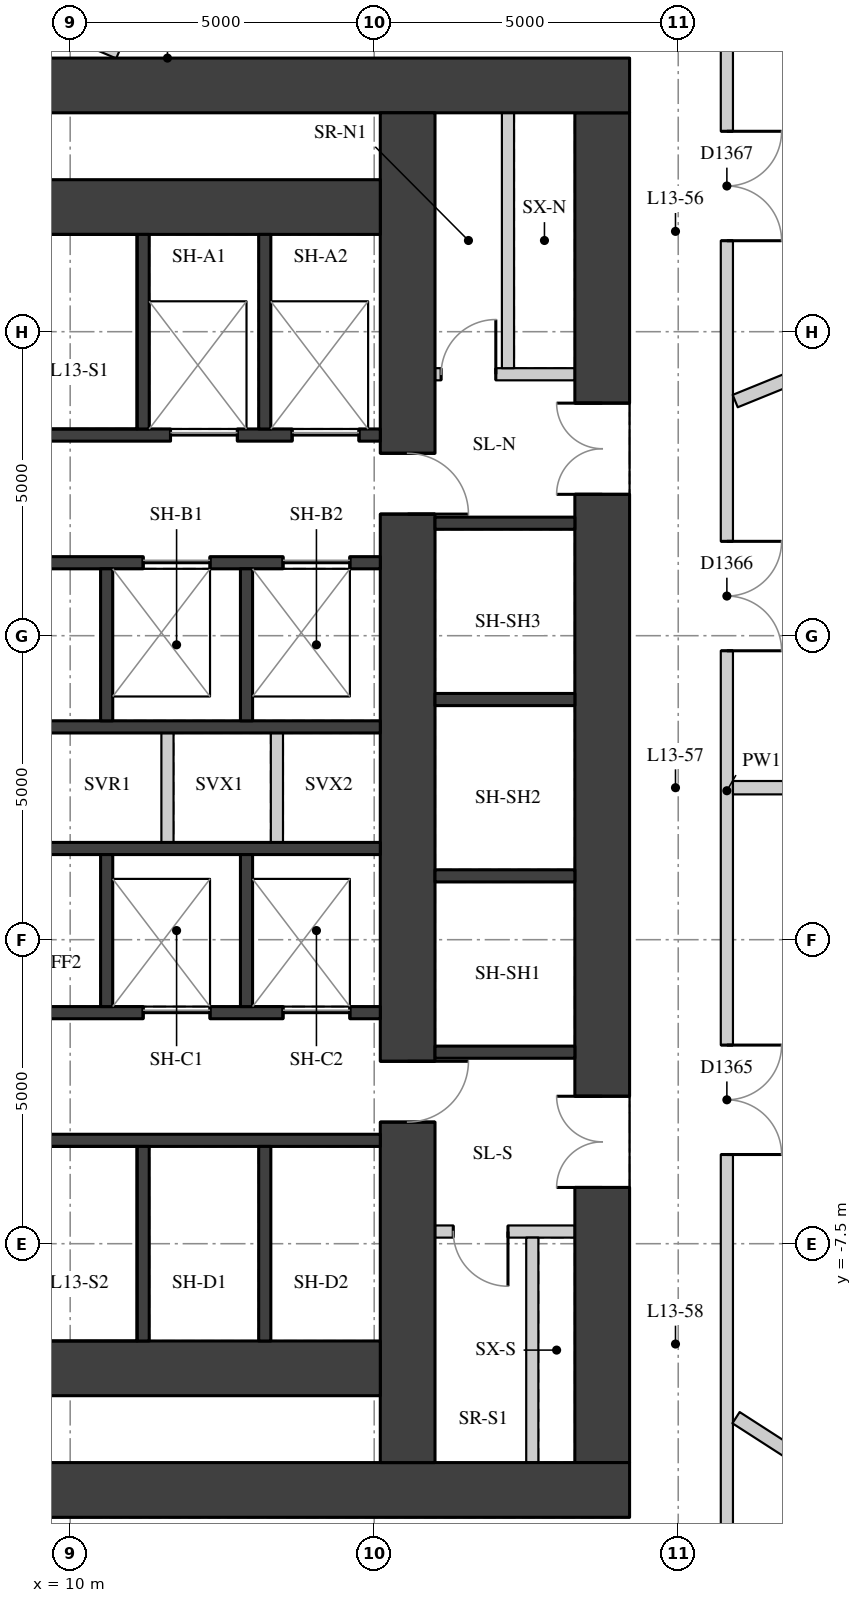
"""IFC4 building model, lengths in metres.
Left out: names, types, materials, properties, quantities, classifications, styles, units other than length and angle.
Written with IfcOpenShell. Run it as: python <this file> out.ifc"""

import sys

from ifc_helpers import new_model, si_unit, direction, frame, frame_2d, origin, place, context, subcontext, project, spatial, rectangle, extrude, element, fill, save


model = new_model("IFC4")
c1 = context("Model", 3, precision=1e-05, world=origin(), true_north=direction((0.0, 1.0)))
c2 = subcontext(c1, "Body", "Model", "MODEL_VIEW")
j1 = project(units=[si_unit("LENGTHUNIT", "METRE"), si_unit("PLANEANGLEUNIT", "RADIAN")], contexts=[c1])
p1 = place(None, origin())
s1 = spatial("IfcSite", under=j1, at=p1, CompositionType="ELEMENT")
p2 = place(p1, origin())
s2 = spatial("IfcBuilding", under=s1, at=p2, CompositionType="ELEMENT")
p3 = place(p2, frame((0.0, 0.0, 51.4)))
s3 = spatial("IfcBuildingStorey", under=s2, at=p3, CompositionType="ELEMENT", Elevation=51.4)
p4 = place(p3, frame((18.75, -11.1, 0.0), z_axis=(0.0, 0.0, 1.0), x_axis=(0.0, 1.0, 0.0)))
e1 = element("IfcWall", 1, at=p4, inside=s3, PredefinedType="SHEAR", context=c2, shape_type="SweptSolid", body=[
    extrude(rectangle(XDim=22.2, YDim=0.9, at=frame_2d((11.1, 0.0))), origin(), (0.0, 0.0, 1.0), 3.02),
])
p5 = place(p4, frame((15.925, 0.0, 0.0)))
e2 = element("IfcOpeningElement", 2, at=p5, cuts=e1, PredefinedType="OPENING", context=c2, shape_type="SweptSolid", body=[
    extrude(rectangle(XDim=1.5, YDim=2.1, at=frame_2d((0.75, 1.05))), frame((0.0, 0.46, 0.0), z_axis=(0.0, -1.0, 0.0), x_axis=(1.0, 0.0, 0.0)), (0.0, 0.0, 1.0), 0.92),
])
p6 = place(p4, frame((4.525, 0.0, 0.0)))
e3 = element("IfcOpeningElement", 3, at=p6, cuts=e1, PredefinedType="OPENING", context=c2, shape_type="SweptSolid", body=[
    extrude(rectangle(XDim=1.5, YDim=2.1, at=frame_2d((0.75, 1.05))), frame((0.0, 0.46, 0.0), z_axis=(0.0, -1.0, 0.0), x_axis=(1.0, 0.0, 0.0)), (0.0, 0.0, 1.0), 0.92),
])
for number, where, z_axis, x_axis in (
    (4, (4.0, 11.55, 0.0), (0.0, 0.0, 1.0), (1.0, 0.0, 0.0)),
    (5, (4.0, -11.55, 0.0), (0.0, 0.0, 1.0), (1.0, 0.0, 0.0)),
):
    element("IfcWall", number, at=place(p3, frame(where, z_axis=z_axis, x_axis=x_axis)), inside=s3, PredefinedType="SHEAR", context=c2, shape_type="SweptSolid", body=[
        extrude(rectangle(XDim=15.2, YDim=0.9, at=frame_2d((7.6, 0.0))), origin(), (0.0, 0.0, 1.0), 3.02),
    ])
p7 = place(p3, frame((15.55, -11.1, 0.0), z_axis=(0.0, 0.0, 1.0), x_axis=(0.0, 1.0, 0.0)))
e6 = element("IfcWall", 6, at=p7, inside=s3, PredefinedType="SHEAR", context=c2, shape_type="SweptSolid", body=[
    extrude(rectangle(XDim=22.2, YDim=0.9, at=frame_2d((11.1, 0.0))), origin(), (0.0, 0.0, 1.0), 3.02),
])
p8 = place(p7, frame((15.6, 0.0, 0.0)))
e7 = element("IfcOpeningElement", 7, at=p8, cuts=e6, PredefinedType="OPENING", context=c2, shape_type="SweptSolid", body=[
    extrude(rectangle(XDim=1.0, YDim=2.1, at=frame_2d((0.5, 1.05))), frame((0.0, 0.46, 0.0), z_axis=(0.0, -1.0, 0.0), x_axis=(1.0, 0.0, 0.0)), (0.0, 0.0, 1.0), 0.92),
])
p9 = place(p7, frame((5.6, 0.0, 0.0)))
e8 = element("IfcOpeningElement", 8, at=p9, cuts=e6, PredefinedType="OPENING", context=c2, shape_type="SweptSolid", body=[
    extrude(rectangle(XDim=1.0, YDim=2.1, at=frame_2d((0.5, 1.05))), frame((0.0, 0.46, 0.0), z_axis=(0.0, -1.0, 0.0), x_axis=(1.0, 0.0, 0.0)), (0.0, 0.0, 1.0), 0.92),
])
for number, where, z_axis, x_axis in (
    (9, (4.9, 9.55, 0.0), (0.0, 0.0, 1.0), (1.0, 0.0, 0.0)),
    (10, (4.9, -9.55, 0.0), (0.0, 0.0, 1.0), (1.0, 0.0, 0.0)),
):
    element("IfcWall", number, at=place(p3, frame(where, z_axis=z_axis, x_axis=x_axis)), inside=s3, PredefinedType="SHEAR", context=c2, shape_type="SweptSolid", body=[
        extrude(rectangle(XDim=10.2, YDim=0.9, at=frame_2d((5.1, 0.0))), origin(), (0.0, 0.0, 1.0), 3.02),
    ])
p10 = place(p3, frame((4.9, 5.8, 0.0), z_axis=(0.0, 0.0, 1.0), x_axis=(1.0, 0.0, 0.0)))
e11 = element("IfcWall", 11, at=p10, inside=s3, PredefinedType="SHEAR", context=c2, shape_type="SweptSolid", body=[
    extrude(rectangle(XDim=10.2, YDim=0.2, at=frame_2d((5.1, 0.0))), origin(), (0.0, 0.0, 1.0), 3.02),
])
p11 = place(p10, frame((6.75, 0.0, 0.0)))
e12 = element("IfcOpeningElement", 12, at=p11, cuts=e11, PredefinedType="OPENING", context=c2, shape_type="SweptSolid", body=[
    extrude(rectangle(XDim=1.1, YDim=2.1, at=frame_2d((0.55, 1.05))), frame((0.0, 0.11, 0.0), z_axis=(0.0, -1.0, 0.0), x_axis=(1.0, 0.0, 0.0)), (0.0, 0.0, 1.0), 0.22),
])
p12 = place(p10, frame((8.75, 0.0, 0.0)))
e13 = element("IfcOpeningElement", 13, at=p12, cuts=e11, PredefinedType="OPENING", context=c2, shape_type="SweptSolid", body=[
    extrude(rectangle(XDim=1.1, YDim=2.1, at=frame_2d((0.55, 1.05))), frame((0.0, 0.11, 0.0), z_axis=(0.0, -1.0, 0.0), x_axis=(1.0, 0.0, 0.0)), (0.0, 0.0, 1.0), 0.22),
])
p13 = place(p3, frame((4.9, 3.7, 0.0), z_axis=(0.0, 0.0, 1.0), x_axis=(1.0, 0.0, 0.0)))
e14 = element("IfcWall", 14, at=p13, inside=s3, PredefinedType="SHEAR", context=c2, shape_type="SweptSolid", body=[
    extrude(rectangle(XDim=10.2, YDim=0.2, at=frame_2d((5.1, 0.0))), origin(), (0.0, 0.0, 1.0), 3.02),
])
p14 = place(p13, frame((6.3, 0.0, 0.0)))
e15 = element("IfcOpeningElement", 15, at=p14, cuts=e14, PredefinedType="OPENING", context=c2, shape_type="SweptSolid", body=[
    extrude(rectangle(XDim=1.1, YDim=2.1, at=frame_2d((0.55, 1.05))), frame((0.0, 0.11, 0.0), z_axis=(0.0, -1.0, 0.0), x_axis=(1.0, 0.0, 0.0)), (0.0, 0.0, 1.0), 0.22),
])
p15 = place(p13, frame((8.6, 0.0, 0.0)))
e16 = element("IfcOpeningElement", 16, at=p15, cuts=e14, PredefinedType="OPENING", context=c2, shape_type="SweptSolid", body=[
    extrude(rectangle(XDim=1.1, YDim=2.1, at=frame_2d((0.55, 1.05))), frame((0.0, 0.11, 0.0), z_axis=(0.0, -1.0, 0.0), x_axis=(1.0, 0.0, 0.0)), (0.0, 0.0, 1.0), 0.22),
])
for number, where, z_axis, x_axis in (
    (17, (4.9, 1.0, 0.0), (0.0, 0.0, 1.0), (1.0, 0.0, 0.0)),
    (18, (4.9, -1.0, 0.0), (0.0, 0.0, 1.0), (1.0, 0.0, 0.0)),
):
    element("IfcWall", number, at=place(p3, frame(where, z_axis=z_axis, x_axis=x_axis)), inside=s3, PredefinedType="SHEAR", context=c2, shape_type="SweptSolid", body=[
        extrude(rectangle(XDim=10.2, YDim=0.2, at=frame_2d((5.1, 0.0))), origin(), (0.0, 0.0, 1.0), 3.02),
    ])
p16 = place(p3, frame((4.9, -3.7, 0.0), z_axis=(0.0, 0.0, 1.0), x_axis=(1.0, 0.0, 0.0)))
e19 = element("IfcWall", 19, at=p16, inside=s3, PredefinedType="SHEAR", context=c2, shape_type="SweptSolid", body=[
    extrude(rectangle(XDim=10.2, YDim=0.2, at=frame_2d((5.1, 0.0))), origin(), (0.0, 0.0, 1.0), 3.02),
])
p17 = place(p16, frame((6.3, 0.0, 0.0)))
e20 = element("IfcOpeningElement", 20, at=p17, cuts=e19, PredefinedType="OPENING", context=c2, shape_type="SweptSolid", body=[
    extrude(rectangle(XDim=1.1, YDim=2.1, at=frame_2d((0.55, 1.05))), frame((0.0, 0.11, 0.0), z_axis=(0.0, -1.0, 0.0), x_axis=(1.0, 0.0, 0.0)), (0.0, 0.0, 1.0), 0.22),
])
p18 = place(p16, frame((8.6, 0.0, 0.0)))
e21 = element("IfcOpeningElement", 21, at=p18, cuts=e19, PredefinedType="OPENING", context=c2, shape_type="SweptSolid", body=[
    extrude(rectangle(XDim=1.1, YDim=2.1, at=frame_2d((0.55, 1.05))), frame((0.0, 0.11, 0.0), z_axis=(0.0, -1.0, 0.0), x_axis=(1.0, 0.0, 0.0)), (0.0, 0.0, 1.0), 0.22),
])
p19 = place(p3, frame((4.9, -5.8, 0.0), z_axis=(0.0, 0.0, 1.0), x_axis=(1.0, 0.0, 0.0)))
e22 = element("IfcWall", 22, at=p19, inside=s3, PredefinedType="SHEAR", context=c2, shape_type="SweptSolid", body=[
    extrude(rectangle(XDim=10.2, YDim=0.2, at=frame_2d((5.1, 0.0))), origin(), (0.0, 0.0, 1.0), 3.02),
])
for number, where, z_axis, x_axis in (
    (23, (11.2, 5.9, 0.0), (0.0, 0.0, 1.0), (0.0, 1.0, 0.0)),
    (24, (11.2, -9.1, 0.0), (0.0, 0.0, 1.0), (0.0, 1.0, 0.0)),
    (25, (13.2, 5.9, 0.0), (0.0, 0.0, 1.0), (0.0, 1.0, 0.0)),
    (26, (13.2, -9.1, 0.0), (0.0, 0.0, 1.0), (0.0, 1.0, 0.0)),
):
    element("IfcWall", number, at=place(p3, frame(where, z_axis=z_axis, x_axis=x_axis)), inside=s3, PredefinedType="SHEAR", context=c2, shape_type="SweptSolid", body=[
        extrude(rectangle(XDim=3.2, YDim=0.2, at=frame_2d((1.6, 0.0))), origin(), (0.0, 0.0, 1.0), 3.02),
    ])
for number, where, z_axis, x_axis in (
    (27, (10.6, 1.1, 0.0), (0.0, 0.0, 1.0), (0.0, 1.0, 0.0)),
    (28, (10.6, -3.6, 0.0), (0.0, 0.0, 1.0), (0.0, 1.0, 0.0)),
    (29, (12.9, 1.1, 0.0), (0.0, 0.0, 1.0), (0.0, 1.0, 0.0)),
    (30, (12.9, -3.6, 0.0), (0.0, 0.0, 1.0), (0.0, 1.0, 0.0)),
):
    element("IfcWall", number, at=place(p3, frame(where, z_axis=z_axis, x_axis=x_axis)), inside=s3, PredefinedType="SHEAR", context=c2, shape_type="SweptSolid", body=[
        extrude(rectangle(XDim=2.5, YDim=0.2, at=frame_2d((1.25, 0.0))), origin(), (0.0, 0.0, 1.0), 3.02),
    ])
for number, where, z_axis, x_axis in (
    (31, (11.6, -0.9, 0.0), (0.0, 0.0, 1.0), (0.0, 1.0, 0.0)),
    (32, (13.4, -0.9, 0.0), (0.0, 0.0, 1.0), (0.0, 1.0, 0.0)),
):
    element("IfcWall", number, at=place(p3, frame(where, z_axis=z_axis, x_axis=x_axis)), inside=s3, PredefinedType="PARTITIONING", context=c2, shape_type="SweptSolid", body=[
        extrude(rectangle(XDim=1.8, YDim=0.2, at=frame_2d((0.9, 0.0))), origin(), (0.0, 0.0, 1.0), 3.02),
    ])
for number, where, z_axis, x_axis in (
    (33, (16.0, -4.35, 0.0), (0.0, 0.0, 1.0), (1.0, 0.0, 0.0)),
    (34, (16.0, -1.45, 0.0), (0.0, 0.0, 1.0), (1.0, 0.0, 0.0)),
    (35, (16.0, 1.45, 0.0), (0.0, 0.0, 1.0), (1.0, 0.0, 0.0)),
    (36, (16.0, 4.35, 0.0), (0.0, 0.0, 1.0), (1.0, 0.0, 0.0)),
):
    element("IfcWall", number, at=place(p3, frame(where, z_axis=z_axis, x_axis=x_axis)), inside=s3, PredefinedType="SHEAR", context=c2, shape_type="SweptSolid", body=[
        extrude(rectangle(XDim=2.3, YDim=0.2, at=frame_2d((1.15, 0.0))), origin(), (0.0, 0.0, 1.0), 3.02),
    ])
p20 = place(p3, frame((16.0, 6.8, 0.0), z_axis=(0.0, 0.0, 1.0), x_axis=(1.0, 0.0, 0.0)))
e37 = element("IfcWall", 37, at=p20, inside=s3, PredefinedType="PARTITIONING", context=c2, shape_type="SweptSolid", body=[
    extrude(rectangle(XDim=2.3, YDim=0.2, at=frame_2d((1.15, 0.0))), origin(), (0.0, 0.0, 1.0), 3.02),
])
p21 = place(p20, frame((0.1, 0.0, 0.0)))
e38 = element("IfcOpeningElement", 38, at=p21, cuts=e37, PredefinedType="OPENING", context=c2, shape_type="SweptSolid", body=[
    extrude(rectangle(XDim=0.9, YDim=2.1, at=frame_2d((0.45, 1.05))), frame((0.0, 0.11, 0.0), z_axis=(0.0, -1.0, 0.0), x_axis=(1.0, 0.0, 0.0)), (0.0, 0.0, 1.0), 0.22),
])
p22 = place(p3, frame((17.2, 6.9, 0.0), z_axis=(0.0, 0.0, 1.0), x_axis=(0.0, 1.0, 0.0)))
e39 = element("IfcWall", 39, at=p22, inside=s3, PredefinedType="PARTITIONING", context=c2, shape_type="SweptSolid", body=[
    extrude(rectangle(XDim=4.2, YDim=0.2, at=frame_2d((2.1, 0.0))), origin(), (0.0, 0.0, 1.0), 3.02),
])
p23 = place(p3, frame((16.0, -7.3, 0.0), z_axis=(0.0, 0.0, 1.0), x_axis=(1.0, 0.0, 0.0)))
e40 = element("IfcWall", 40, at=p23, inside=s3, PredefinedType="PARTITIONING", context=c2, shape_type="SweptSolid", body=[
    extrude(rectangle(XDim=2.3, YDim=0.2, at=frame_2d((1.15, 0.0))), origin(), (0.0, 0.0, 1.0), 3.02),
])
p24 = place(p23, frame((0.3, 0.0, 0.0)))
e41 = element("IfcOpeningElement", 41, at=p24, cuts=e40, PredefinedType="OPENING", context=c2, shape_type="SweptSolid", body=[
    extrude(rectangle(XDim=0.9, YDim=2.1, at=frame_2d((0.45, 1.05))), frame((0.0, 0.11, 0.0), z_axis=(0.0, -1.0, 0.0), x_axis=(1.0, 0.0, 0.0)), (0.0, 0.0, 1.0), 0.22),
])
p25 = place(p3, frame((17.6, -11.1, 0.0), z_axis=(0.0, 0.0, 1.0), x_axis=(0.0, 1.0, 0.0)))
e42 = element("IfcWall", 42, at=p25, inside=s3, PredefinedType="PARTITIONING", context=c2, shape_type="SweptSolid", body=[
    extrude(rectangle(XDim=3.7, YDim=0.2, at=frame_2d((1.85, 0.0))), origin(), (0.0, 0.0, 1.0), 3.02),
])
p26 = place(p3, frame((20.8, 13.5, 0.0), z_axis=(0.0, 0.0, 1.0), x_axis=(0.0, -1.0, 0.0)))
e43 = element("IfcWall", 43, at=p26, inside=s3, PredefinedType="PARTITIONING", context=c2, shape_type="SweptSolid", body=[
    extrude(rectangle(XDim=27.1, YDim=0.2, at=frame_2d((13.55, 0.0))), origin(), (0.0, 0.0, 1.0), 3.02),
])
p27 = place(p26, frame((17.733, 0.0, 0.0)))
e44 = element("IfcOpeningElement", 44, at=p27, cuts=e43, PredefinedType="OPENING", context=c2, shape_type="SweptSolid", body=[
    extrude(rectangle(XDim=1.8, YDim=2.1, at=frame_2d((0.9, 1.05))), frame((0.0, 0.11, 0.0), z_axis=(0.0, -1.0, 0.0), x_axis=(1.0, 0.0, 0.0)), (0.0, 0.0, 1.0), 0.22),
])
p28 = place(p26, frame((9.448, 0.0, 0.0)))
e45 = element("IfcOpeningElement", 45, at=p28, cuts=e43, PredefinedType="OPENING", context=c2, shape_type="SweptSolid", body=[
    extrude(rectangle(XDim=1.8, YDim=2.1, at=frame_2d((0.9, 1.05))), frame((0.0, 0.11, 0.0), z_axis=(0.0, -1.0, 0.0), x_axis=(1.0, 0.0, 0.0)), (0.0, 0.0, 1.0), 0.22),
])
p29 = place(p26, frame((2.704, 0.0, 0.0)))
e46 = element("IfcOpeningElement", 46, at=p29, cuts=e43, PredefinedType="OPENING", context=c2, shape_type="SweptSolid", body=[
    extrude(rectangle(XDim=1.8, YDim=2.1, at=frame_2d((0.9, 1.05))), frame((0.0, 0.11, 0.0), z_axis=(0.0, -1.0, 0.0), x_axis=(1.0, 0.0, 0.0)), (0.0, 0.0, 1.0), 0.22),
])
p30 = place(p3, frame((5.149, 14.456, 0.0), z_axis=(0.0, 0.0, 1.0), x_axis=(0.920541383735, -0.390645057348, 0.0)))
e47 = element("IfcWall", 47, at=p30, inside=s3, PredefinedType="PARTITIONING", context=c2, shape_type="SweptSolid", body=[
    extrude(rectangle(XDim=6.124, YDim=0.15, at=frame_2d((3.062, 0.0))), origin(), (0.0, 0.0, 1.0), 3.02),
])
p31 = place(p30, frame((2.508, 0.0, 0.0)))
e48 = element("IfcOpeningElement", 48, at=p31, cuts=e47, PredefinedType="OPENING", context=c2, shape_type="SweptSolid", body=[
    extrude(rectangle(XDim=0.9, YDim=2.1, at=frame_2d((0.45, 1.05))), frame((0.0, 0.085, 0.0), z_axis=(0.0, -1.0, 0.0), x_axis=(1.0, 0.0, 0.0)), (0.0, 0.0, 1.0), 0.17),
])
p32 = place(p3, frame((27.5, 0.0, 0.0), z_axis=(0.0, 0.0, 1.0), x_axis=(-1.0, 0.0, 0.0)))
e49 = element("IfcWall", 49, at=p32, inside=s3, PredefinedType="PARTITIONING", context=c2, shape_type="SweptSolid", body=[
    extrude(rectangle(XDim=6.6, YDim=0.22, at=frame_2d((3.3, 0.0))), origin(), (0.0, 0.0, 1.0), 2.47),
])
p33 = place(p3, frame((25.851, 8.354, 0.0), z_axis=(0.0, 0.0, 1.0), x_axis=(-0.926546814299, -0.376179479653, 0.0)))
e50 = element("IfcWall", 50, at=p33, inside=s3, PredefinedType="PARTITIONING", context=c2, shape_type="SweptSolid", body=[
    extrude(rectangle(XDim=5.304, YDim=0.22, at=frame_2d((2.652, 0.0))), origin(), (0.0, 0.0, 1.0), 3.02),
])
p34 = place(p3, frame((23.835, -12.219, 0.0), z_axis=(0.0, 0.0, 1.0), x_axis=(-0.840694872373, 0.541509124176, 0.0)))
e51 = element("IfcWall", 51, at=p34, inside=s3, PredefinedType="PARTITIONING", context=c2, shape_type="SweptSolid", body=[
    extrude(rectangle(XDim=3.43, YDim=0.22, at=frame_2d((1.715, 0.0))), origin(), (0.0, 0.0, 1.0), 3.02),
])
p35 = place(p5, origin())
e52 = element("IfcDoor", 52, at=p35, inside=s3, OperationType="DOUBLE_DOOR_SINGLE_SWING", PredefinedType="DOOR", context=c2, shape_type="SweptSolid", body=[
    extrude(rectangle(XDim=1.5, YDim=2.1, at=frame_2d((0.75, 1.05))), frame((0.0, 0.025, 0.0), z_axis=(0.0, -1.0, 0.0), x_axis=(1.0, 0.0, 0.0)), (0.0, 0.0, 1.0), 0.05),
])
fill(e2, e52)
p36 = place(p6, origin())
e53 = element("IfcDoor", 53, at=p36, inside=s3, OperationType="DOUBLE_DOOR_SINGLE_SWING", PredefinedType="DOOR", context=c2, shape_type="SweptSolid", body=[
    extrude(rectangle(XDim=1.5, YDim=2.1, at=frame_2d((0.75, 1.05))), frame((0.0, 0.025, 0.0), z_axis=(0.0, -1.0, 0.0), x_axis=(1.0, 0.0, 0.0)), (0.0, 0.0, 1.0), 0.05),
])
fill(e3, e53)
p37 = place(p11, origin())
e54 = element("IfcDoor", 54, at=p37, inside=s3, OperationType="DOUBLE_DOOR_SLIDING", PredefinedType="DOOR", context=c2, shape_type="SweptSolid", body=[
    extrude(rectangle(XDim=1.1, YDim=2.1, at=frame_2d((0.55, 1.05))), frame((0.0, 0.025, 0.0), z_axis=(0.0, -1.0, 0.0), x_axis=(1.0, 0.0, 0.0)), (0.0, 0.0, 1.0), 0.05),
])
fill(e12, e54)
p38 = place(p12, origin())
e55 = element("IfcDoor", 55, at=p38, inside=s3, OperationType="DOUBLE_DOOR_SLIDING", PredefinedType="DOOR", context=c2, shape_type="SweptSolid", body=[
    extrude(rectangle(XDim=1.1, YDim=2.1, at=frame_2d((0.55, 1.05))), frame((0.0, 0.025, 0.0), z_axis=(0.0, -1.0, 0.0), x_axis=(1.0, 0.0, 0.0)), (0.0, 0.0, 1.0), 0.05),
])
fill(e13, e55)
p39 = place(p14, origin())
e56 = element("IfcDoor", 56, at=p39, inside=s3, OperationType="DOUBLE_DOOR_SLIDING", PredefinedType="DOOR", context=c2, shape_type="SweptSolid", body=[
    extrude(rectangle(XDim=1.1, YDim=2.1, at=frame_2d((0.55, 1.05))), frame((0.0, 0.025, 0.0), z_axis=(0.0, -1.0, 0.0), x_axis=(1.0, 0.0, 0.0)), (0.0, 0.0, 1.0), 0.05),
])
fill(e15, e56)
p40 = place(p15, origin())
e57 = element("IfcDoor", 57, at=p40, inside=s3, OperationType="DOUBLE_DOOR_SLIDING", PredefinedType="DOOR", context=c2, shape_type="SweptSolid", body=[
    extrude(rectangle(XDim=1.1, YDim=2.1, at=frame_2d((0.55, 1.05))), frame((0.0, 0.025, 0.0), z_axis=(0.0, -1.0, 0.0), x_axis=(1.0, 0.0, 0.0)), (0.0, 0.0, 1.0), 0.05),
])
fill(e16, e57)
p41 = place(p17, origin())
e58 = element("IfcDoor", 58, at=p41, inside=s3, OperationType="DOUBLE_DOOR_SLIDING", PredefinedType="DOOR", context=c2, shape_type="SweptSolid", body=[
    extrude(rectangle(XDim=1.1, YDim=2.1, at=frame_2d((0.55, 1.05))), frame((0.0, 0.025, 0.0), z_axis=(0.0, -1.0, 0.0), x_axis=(1.0, 0.0, 0.0)), (0.0, 0.0, 1.0), 0.05),
])
fill(e20, e58)
p42 = place(p18, origin())
e59 = element("IfcDoor", 59, at=p42, inside=s3, OperationType="DOUBLE_DOOR_SLIDING", PredefinedType="DOOR", context=c2, shape_type="SweptSolid", body=[
    extrude(rectangle(XDim=1.1, YDim=2.1, at=frame_2d((0.55, 1.05))), frame((0.0, 0.025, 0.0), z_axis=(0.0, -1.0, 0.0), x_axis=(1.0, 0.0, 0.0)), (0.0, 0.0, 1.0), 0.05),
])
fill(e21, e59)
p43 = place(p8, origin())
e60 = element("IfcDoor", 60, at=p43, inside=s3, OperationType="SINGLE_SWING_RIGHT", PredefinedType="DOOR", context=c2, shape_type="SweptSolid", body=[
    extrude(rectangle(XDim=1.0, YDim=2.1, at=frame_2d((0.5, 1.05))), frame((0.0, 0.025, 0.0), z_axis=(0.0, -1.0, 0.0), x_axis=(1.0, 0.0, 0.0)), (0.0, 0.0, 1.0), 0.05),
])
fill(e7, e60)
p44 = place(p21, origin())
e61 = element("IfcDoor", 61, at=p44, inside=s3, OperationType="SINGLE_SWING_RIGHT", PredefinedType="DOOR", context=c2, shape_type="SweptSolid", body=[
    extrude(rectangle(XDim=0.9, YDim=2.1, at=frame_2d((0.45, 1.05))), frame((0.0, 0.025, 0.0), z_axis=(0.0, -1.0, 0.0), x_axis=(1.0, 0.0, 0.0)), (0.0, 0.0, 1.0), 0.05),
])
fill(e38, e61)
p45 = place(p9, origin())
e62 = element("IfcDoor", 62, at=p45, inside=s3, OperationType="SINGLE_SWING_LEFT", PredefinedType="DOOR", context=c2, shape_type="SweptSolid", body=[
    extrude(rectangle(XDim=1.0, YDim=2.1, at=frame_2d((0.5, 1.05))), frame((0.0, 0.025, 0.0), z_axis=(0.0, -1.0, 0.0), x_axis=(1.0, 0.0, 0.0)), (0.0, 0.0, 1.0), 0.05),
])
fill(e8, e62)
p46 = place(p24, origin())
e63 = element("IfcDoor", 63, at=p46, inside=s3, OperationType="SINGLE_SWING_LEFT", PredefinedType="DOOR", context=c2, shape_type="SweptSolid", body=[
    extrude(rectangle(XDim=0.9, YDim=2.1, at=frame_2d((0.45, 1.05))), frame((0.0, 0.025, 0.0), z_axis=(0.0, -1.0, 0.0), x_axis=(1.0, 0.0, 0.0)), (0.0, 0.0, 1.0), 0.05),
])
fill(e41, e63)
p47 = place(p27, origin())
e64 = element("IfcDoor", 64, at=p47, inside=s3, OperationType="DOUBLE_DOOR_SINGLE_SWING", PredefinedType="DOOR", context=c2, shape_type="SweptSolid", body=[
    extrude(rectangle(XDim=1.8, YDim=2.1, at=frame_2d((0.9, 1.05))), frame((0.0, 0.025, 0.0), z_axis=(0.0, -1.0, 0.0), x_axis=(1.0, 0.0, 0.0)), (0.0, 0.0, 1.0), 0.05),
])
fill(e44, e64)
p48 = place(p28, origin())
e65 = element("IfcDoor", 65, at=p48, inside=s3, OperationType="DOUBLE_DOOR_SINGLE_SWING", PredefinedType="DOOR", context=c2, shape_type="SweptSolid", body=[
    extrude(rectangle(XDim=1.8, YDim=2.1, at=frame_2d((0.9, 1.05))), frame((0.0, 0.025, 0.0), z_axis=(0.0, -1.0, 0.0), x_axis=(1.0, 0.0, 0.0)), (0.0, 0.0, 1.0), 0.05),
])
fill(e45, e65)
p49 = place(p29, origin())
e66 = element("IfcDoor", 66, at=p49, inside=s3, OperationType="DOUBLE_DOOR_SINGLE_SWING", PredefinedType="DOOR", context=c2, shape_type="SweptSolid", body=[
    extrude(rectangle(XDim=1.8, YDim=2.1, at=frame_2d((0.9, 1.05))), frame((0.0, 0.025, 0.0), z_axis=(0.0, -1.0, 0.0), x_axis=(1.0, 0.0, 0.0)), (0.0, 0.0, 1.0), 0.05),
])
fill(e46, e66)
save(model, sys.argv[1])
